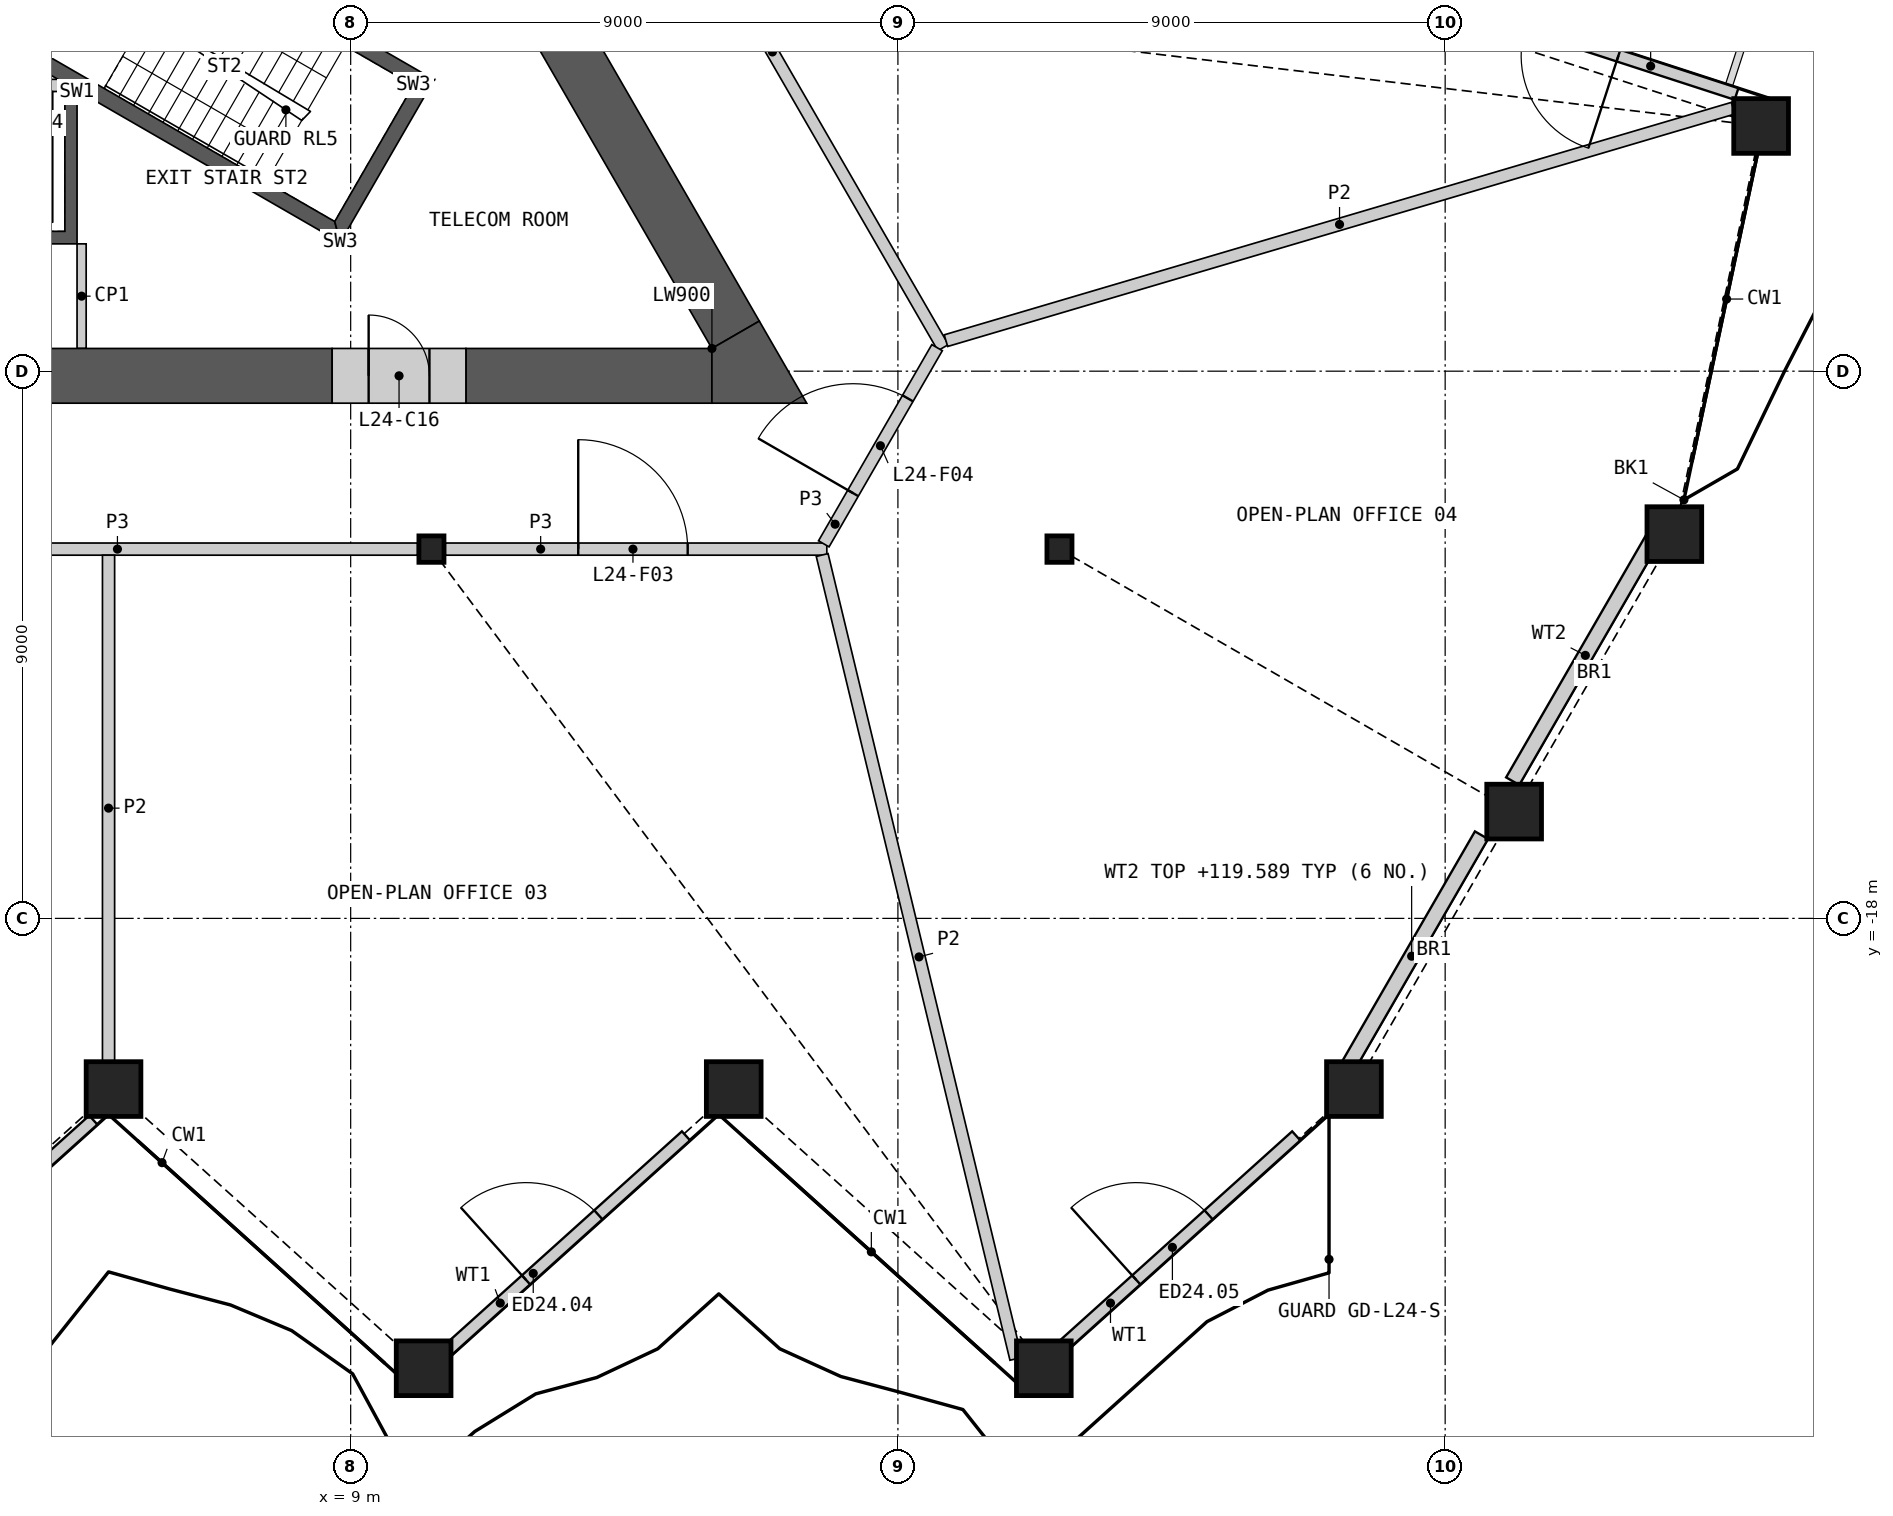
"""IFC4 building model, lengths in metres.
Left out: names, types, materials, properties, quantities, classifications, styles, units other than length and angle.
Written with IfcOpenShell. Run it as: python <this file> out.ifc"""

import sys

from ifc_helpers import new_model, si_unit, direction, frame, frame_2d, origin, origin_2d, place, context, subcontext, project, spatial, polyline, rectangle, hollow_rectangle, i_section, outline, extrude, element, fill, save


model = new_model("IFC4")
c1 = context("Model", 3, precision=1e-05, world=origin(), true_north=direction((0.0, 1.0)))
c2 = subcontext(c1, "Body", "Model", "MODEL_VIEW")
j1 = project(units=[si_unit("LENGTHUNIT", "METRE"), si_unit("PLANEANGLEUNIT", "RADIAN")], contexts=[c1])
p1 = place(None, origin())
s1 = spatial("IfcSite", under=j1, at=p1, CompositionType="ELEMENT")
p2 = place(p1, origin())
s2 = spatial("IfcBuilding", under=s1, at=p2, CompositionType="ELEMENT")
p3 = place(p2, frame((0.0, 0.0, 116.4)))
s3 = spatial("IfcBuildingStorey", under=s2, at=p3, CompositionType="ELEMENT", Elevation=116.4)
for number, where, z_axis, x_axis in (
    (1, (5.1, -20.807, 0.0), (0.0, 0.0, 1.0), (1.0, 0.0, 0.0)),
    (2, (10.2, -25.399, 0.0), (0.0, 0.0, 1.0), (1.0, 0.0, 0.0)),
    (3, (15.3, -20.807, 0.0), (0.0, 0.0, 1.0), (1.0, 0.0, 0.0)),
    (4, (20.4, -25.399, 0.0), (0.0, 0.0, 1.0), (1.0, 0.0, 0.0)),
    (5, (25.5, -20.807, 0.0), (0.0, 0.0, 1.0), (1.0, 0.0, 0.0)),
    (6, (28.135, -16.243, 0.0), (0.0, 0.0, 1.0), (1.0, 0.0, 0.0)),
    (7, (30.769, -11.68, 0.0), (0.0, 0.0, 1.0), (1.0, 0.0, 0.0)),
    (8, (32.196, -4.967, 0.0), (0.0, 0.0, 1.0), (1.0, 0.0, 0.0)),
):
    element("IfcColumn", number, at=place(p3, frame(where, z_axis=z_axis, x_axis=x_axis)), inside=s3, PredefinedType="COLUMN", context=c2, shape_type="SweptSolid", body=[
        extrude(hollow_rectangle(XDim=0.9, YDim=0.9, WallThickness=0.06, at=origin_2d()), origin(), (0.0, 0.0, 1.0), 4.2),
    ])
for number, where, z_axis, x_axis in (
    (9, (10.328, -11.926, 0.0), (0.0, 0.0, 1.0), (1.0, 0.0, 0.0)),
    (10, (20.657, -11.926, 0.0), (0.0, 0.0, 1.0), (1.0, 0.0, 0.0)),
):
    element("IfcColumn", number, at=place(p3, frame(where, z_axis=z_axis, x_axis=x_axis)), inside=s3, PredefinedType="COLUMN", context=c2, shape_type="SweptSolid", body=[
        extrude(i_section(OverallWidth=0.412, OverallDepth=0.435, WebThickness=0.036, FlangeThickness=0.057, at=origin_2d()), origin(), (0.0, 0.0, 1.0), 4.2),
    ])
p4 = place(p3, frame((0.406, -25.244, 0.0), z_axis=(0.0, 0.0, 1.0), x_axis=(0.743138997535, 0.669137078888, 0.0)))
e11 = element("IfcWall", 11, at=p4, inside=s3, PredefinedType="SOLIDWALL", context=c2, shape_type="SweptSolid", body=[
    extrude(rectangle(XDim=5.869, YDim=0.2, at=frame_2d((2.935, 0.0))), origin(), (0.0, 0.0, 1.0), 3.189),
])
p5 = place(p4, frame((1.94, 0.0, 0.0)))
e12 = element("IfcOpeningElement", 12, at=p5, cuts=e11, PredefinedType="OPENING", context=c2, shape_type="SweptSolid", body=[
    extrude(rectangle(XDim=1.6, YDim=2.4, at=frame_2d((0.8, 1.2))), frame((0.0, 0.11, 0.0), z_axis=(0.0, -1.0, 0.0), x_axis=(1.0, 0.0, 0.0)), (0.0, 0.0, 1.0), 0.22),
])
p6 = place(p3, frame((10.442, -25.244, 0.0), z_axis=(0.0, 0.0, 1.0), x_axis=(0.743134641601, 0.669141916526, 0.0)))
e13 = element("IfcWall", 13, at=p6, inside=s3, PredefinedType="SOLIDWALL", context=c2, shape_type="SweptSolid", body=[
    extrude(rectangle(XDim=5.48, YDim=0.2, at=frame_2d((2.74, 0.0))), origin(), (0.0, 0.0, 1.0), 3.189),
])
p7 = place(p6, frame((1.94, 0.0, 0.0)))
e14 = element("IfcOpeningElement", 14, at=p7, cuts=e13, PredefinedType="OPENING", context=c2, shape_type="SweptSolid", body=[
    extrude(rectangle(XDim=1.6, YDim=2.4, at=frame_2d((0.8, 1.2))), frame((0.0, 0.11, 0.0), z_axis=(0.0, -1.0, 0.0), x_axis=(1.0, 0.0, 0.0)), (0.0, 0.0, 1.0), 0.22),
])
p8 = place(p3, frame((20.478, -25.244, 0.0), z_axis=(0.0, 0.0, 1.0), x_axis=(0.743134641601, 0.669141916526, 0.0)))
e15 = element("IfcWall", 15, at=p8, inside=s3, PredefinedType="SOLIDWALL", context=c2, shape_type="SweptSolid", body=[
    extrude(rectangle(XDim=5.48, YDim=0.2, at=frame_2d((2.74, 0.0))), origin(), (0.0, 0.0, 1.0), 3.189),
])
p9 = place(p8, frame((1.94, 0.0, 0.0)))
e16 = element("IfcOpeningElement", 16, at=p9, cuts=e15, PredefinedType="OPENING", context=c2, shape_type="SweptSolid", body=[
    extrude(rectangle(XDim=1.6, YDim=2.4, at=frame_2d((0.8, 1.2))), frame((0.0, 0.11, 0.0), z_axis=(0.0, -1.0, 0.0), x_axis=(1.0, 0.0, 0.0)), (0.0, 0.0, 1.0), 0.22),
])
p10 = place(p3, frame((25.3, -20.612, 0.0), z_axis=(0.0, 0.0, 1.0), x_axis=(0.500018268964, 0.866014855936, 0.0)))
e17 = element("IfcWall", 17, at=p10, inside=s3, PredefinedType="SOLIDWALL", context=c2, shape_type="SweptSolid", body=[
    extrude(rectangle(XDim=4.596, YDim=0.25, at=frame_2d((2.298, 0.0))), origin(), (0.0, 0.0, 1.0), 3.189),
])
p11 = place(p3, frame((28.111, -15.743, 0.0), z_axis=(0.0, 0.0, 1.0), x_axis=(0.499984810975, 0.866034172995, 0.0)))
e18 = element("IfcWall", 18, at=p11, inside=s3, PredefinedType="SOLIDWALL", context=c2, shape_type="SweptSolid", body=[
    extrude(rectangle(XDim=4.78, YDim=0.25, at=frame_2d((2.39, 0.0))), origin(), (0.0, 0.0, 1.0), 3.189),
])
p12 = place(p3, frame((31.792, -4.441, 0.0), z_axis=(0.0, 0.0, 1.0), x_axis=(-0.951057028782, 0.309015417099, 0.0)))
e19 = element("IfcWall", 19, at=p12, inside=s3, PredefinedType="SOLIDWALL", context=c2, shape_type="SweptSolid", body=[
    extrude(rectangle(XDim=5.938, YDim=0.2, at=frame_2d((2.969, 0.0))), origin(), (0.0, 0.0, 1.0), 3.189),
])
p13 = place(p12, frame((2.042, 0.0, 0.0)))
e20 = element("IfcOpeningElement", 20, at=p13, cuts=e19, PredefinedType="OPENING", context=c2, shape_type="SweptSolid", body=[
    extrude(rectangle(XDim=1.6, YDim=2.4, at=frame_2d((0.8, 1.2))), frame((0.0, 0.11, 0.0), z_axis=(0.0, -1.0, 0.0), x_axis=(1.0, 0.0, 0.0)), (0.0, 0.0, 1.0), 0.22),
])
p14 = place(p3, origin())
e21 = element("IfcWall", 21, at=p14, inside=s3, PredefinedType="SHEAR", context=c2, shape_type="SweptSolid", body=[
    extrude(outline(polyline([(4.5, -4.4), (4.5, -6.906), (-4.5, -6.906), (-4.5, -4.4), (-4.3, -4.4), (-4.3, -6.7), (-2.3, -6.7), (-2.3, -4.4), (-2.1, -4.4), (-2.1, -6.7), (-0.1, -6.7), (-0.1, -4.4), (0.1, -4.4), (0.1, -6.7), (2.1, -6.7), (2.1, -4.4), (2.3, -4.4), (2.3, -6.7), (4.3, -6.7), (4.3, -4.4), (4.5, -4.4)])), origin(), (0.0, 0.0, 1.0), 3.8),
])
p15 = place(p3, frame((-4.187, -4.3, 0.0), z_axis=(0.0, 0.0, 1.0), x_axis=(1.0, 0.0, 0.0)))
e22 = element("IfcWall", 22, at=p15, inside=s3, PredefinedType="SOLIDWALL", context=c2, shape_type="SweptSolid", body=[
    extrude(rectangle(XDim=8.373, YDim=0.2, at=frame_2d((4.187, 0.0))), origin(), (0.0, 0.0, 1.0), 3.8),
])
p16 = place(p15, frame((0.287, 0.0, 0.0)))
e23 = element("IfcOpeningElement", 23, at=p16, cuts=e22, PredefinedType="OPENING", context=c2, shape_type="SweptSolid", body=[
    extrude(rectangle(XDim=1.2, YDim=2.1, at=frame_2d((0.6, 1.05))), frame((0.0, 0.11, 0.0), z_axis=(0.0, -1.0, 0.0), x_axis=(1.0, 0.0, 0.0)), (0.0, 0.0, 1.0), 0.22),
])
p17 = place(p15, frame((2.387, 0.0, 0.0)))
e24 = element("IfcOpeningElement", 24, at=p17, cuts=e22, PredefinedType="OPENING", context=c2, shape_type="SweptSolid", body=[
    extrude(rectangle(XDim=1.4, YDim=2.1, at=frame_2d((0.7, 1.05))), frame((0.0, 0.11, 0.0), z_axis=(0.0, -1.0, 0.0), x_axis=(1.0, 0.0, 0.0)), (0.0, 0.0, 1.0), 0.22),
])
p18 = place(p15, frame((4.737, 0.0, 0.0)))
e25 = element("IfcOpeningElement", 25, at=p18, cuts=e22, PredefinedType="OPENING", context=c2, shape_type="SweptSolid", body=[
    extrude(rectangle(XDim=1.1, YDim=2.1, at=frame_2d((0.55, 1.05))), frame((0.0, 0.11, 0.0), z_axis=(0.0, -1.0, 0.0), x_axis=(1.0, 0.0, 0.0)), (0.0, 0.0, 1.0), 0.22),
])
p19 = place(p15, frame((6.887, 0.0, 0.0)))
e26 = element("IfcOpeningElement", 26, at=p19, cuts=e22, PredefinedType="OPENING", context=c2, shape_type="SweptSolid", body=[
    extrude(rectangle(XDim=1.2, YDim=2.1, at=frame_2d((0.6, 1.05))), frame((0.0, 0.11, 0.0), z_axis=(0.0, -1.0, 0.0), x_axis=(1.0, 0.0, 0.0)), (0.0, 0.0, 1.0), 0.22),
])
p20 = place(p3, origin())
e27 = element("IfcWall", 27, at=p20, inside=s3, PredefinedType="SHEAR", context=c2, shape_type="SweptSolid", body=[
    extrude(outline(polyline([(3.763, -3.956), (8.83, -6.881), (8.738, -6.539), (3.888, -3.739), (3.763, -3.956)])), origin(), (0.0, 0.0, 1.0), 3.8),
])
p21 = place(p3, origin())
e28 = element("IfcWall", 28, at=p21, inside=s3, PredefinedType="SHEAR", context=c2, shape_type="SweptSolid", body=[
    extrude(outline(polyline([(8.83, -6.881), (10.374, -4.206), (10.032, -4.298), (8.738, -6.539), (8.83, -6.881)])), origin(), (0.0, 0.0, 1.0), 3.8),
])
p22 = place(p3, origin())
e29 = element("IfcWall", 29, at=p22, inside=s3, PredefinedType="SHEAR", context=c2, shape_type="SweptSolid", body=[
    extrude(outline(polyline([(10.032, -4.298), (10.374, -4.206), (5.307, -1.281), (5.182, -1.498), (10.032, -4.298)])), origin(), (0.0, 0.0, 1.0), 3.8),
])
p23 = place(p3, frame((3.655, -3.893, 0.0), z_axis=(0.0, 0.0, 1.0), x_axis=(0.499982516597, 0.866035497597, 0.0)))
e30 = element("IfcWall", 30, at=p23, inside=s3, PredefinedType="SHEAR", context=c2, shape_type="SweptSolid", body=[
    extrude(rectangle(XDim=3.088, YDim=0.25, at=frame_2d((1.544, 0.0))), origin(), (0.0, 0.0, 1.0), 3.8),
])
p24 = place(p23, frame((0.994, 0.0, 0.0)))
e31 = element("IfcOpeningElement", 31, at=p24, cuts=e30, PredefinedType="OPENING", context=c2, shape_type="SweptSolid", body=[
    extrude(rectangle(XDim=1.1, YDim=2.1, at=frame_2d((0.55, 1.05))), frame((0.0, 0.135, 0.0), z_axis=(0.0, -1.0, 0.0), x_axis=(1.0, 0.0, 0.0)), (0.0, 0.0, 1.0), 0.27),
])
p25 = place(p3, frame((4.575, -6.906, 0.0), z_axis=(0.0, 0.0, 1.0), x_axis=(0.0, -1.0, 0.0)))
e32 = element("IfcWall", 32, at=p25, inside=s3, PredefinedType="PARTITIONING", context=c2, shape_type="SweptSolid", body=[
    extrude(rectangle(XDim=1.72, YDim=0.15, at=frame_2d((0.86, 0.0))), origin(), (0.0, 0.0, 1.0), 3.8),
])
p26 = place(p3, frame((1.1, -9.076, 0.0), z_axis=(0.0, 0.0, 1.0), x_axis=(1.0, 0.0, 0.0)))
e33 = element("IfcWall", 33, at=p26, inside=s3, PredefinedType="SHEAR", context=c2, shape_type="SweptSolid", body=[
    extrude(rectangle(XDim=7.595, YDim=0.9, at=frame_2d((3.798, 0.0))), origin(), (0.0, 0.0, 1.0), 3.8),
])
p27 = place(p3, frame((10.896, -9.076, 0.0), z_axis=(0.0, 0.0, 1.0), x_axis=(1.0, 0.0, 0.0)))
e34 = element("IfcWall", 34, at=p27, inside=s3, PredefinedType="SHEAR", context=c2, shape_type="SweptSolid", body=[
    extrude(rectangle(XDim=4.046, YDim=0.9, at=frame_2d((2.023, 0.0))), origin(), (0.0, 0.0, 1.0), 3.8),
])
p28 = place(p3, frame((15.331, -8.401, 0.0), z_axis=(0.0, 0.0, 1.0), x_axis=(-0.49999216708, 0.866029926076, 0.0)))
e35 = element("IfcWall", 35, at=p28, inside=s3, PredefinedType="SHEAR", context=c2, shape_type="SweptSolid", body=[
    extrude(rectangle(XDim=12.641, YDim=0.9, at=frame_2d((6.321, 0.0))), origin(), (0.0, 0.0, 1.0), 3.8),
])
p29 = place(p3, origin())
e36 = element("IfcWall", 36, at=p29, inside=s3, PredefinedType="SHEAR", context=c2, shape_type="SweptSolid", body=[
    extrude(outline(polyline([(14.941, -8.626), (15.721, -8.176), (16.5, -9.526), (14.941, -9.526), (14.941, -8.626)])), origin(), (0.0, 0.0, 1.0), 3.8),
])
p30 = place(p3, frame((8.696, -9.076, 0.0), z_axis=(0.0, 0.0, 1.0), x_axis=(1.0, 0.0, 0.0)))
e37 = element("IfcWall", 37, at=p30, inside=s3, PredefinedType="SHEAR", context=c2, shape_type="SweptSolid", body=[
    extrude(rectangle(XDim=2.2, YDim=0.9, at=frame_2d((1.1, 0.0))), origin(), (0.0, 0.0, 1.0), 3.8),
])
p31 = place(p30, frame((0.6, 0.0, 0.0)))
e38 = element("IfcOpeningElement", 38, at=p31, cuts=e37, PredefinedType="OPENING", context=c2, shape_type="SweptSolid", body=[
    extrude(rectangle(XDim=1.0, YDim=2.1, at=frame_2d((0.5, 1.05))), frame((0.0, 0.46, 0.0), z_axis=(0.0, -1.0, 0.0), x_axis=(1.0, 0.0, 0.0)), (0.0, 0.0, 1.0), 0.92),
])
p32 = place(p3, frame((0.227, -11.926, 0.0), z_axis=(0.0, 0.0, 1.0), x_axis=(1.0, 0.0, 0.0)))
e39 = element("IfcWall", 39, at=p32, inside=s3, PredefinedType="PARTITIONING", context=c2, shape_type="SweptSolid", body=[
    extrude(rectangle(XDim=9.874, YDim=0.2, at=frame_2d((4.937, 0.0))), origin(), (0.0, 0.0, 1.0), 3.8),
])
p33 = place(p3, frame((10.556, -11.926, 0.0), z_axis=(0.0, 0.0, 1.0), x_axis=(1.0, 0.0, 0.0)))
e40 = element("IfcWall", 40, at=p33, inside=s3, PredefinedType="PARTITIONING", context=c2, shape_type="SweptSolid", body=[
    extrude(rectangle(XDim=6.275, YDim=0.2, at=frame_2d((3.137, 0.0))), origin(), (0.0, 0.0, 1.0), 3.8),
])
p34 = place(p33, frame((2.187, 0.0, 0.0)))
e41 = element("IfcOpeningElement", 41, at=p34, cuts=e40, PredefinedType="OPENING", context=c2, shape_type="SweptSolid", body=[
    extrude(rectangle(XDim=1.8, YDim=2.1, at=frame_2d((0.9, 1.05))), frame((0.0, 0.11, 0.0), z_axis=(0.0, -1.0, 0.0), x_axis=(1.0, 0.0, 0.0)), (0.0, 0.0, 1.0), 0.22),
])
p35 = place(p3, frame((15.624, -3.209, 0.0), z_axis=(0.0, 0.0, 1.0), x_axis=(0.499997920671, -0.866026604282, 0.0)))
e42 = element("IfcWall", 42, at=p35, inside=s3, PredefinedType="PARTITIONING", context=c2, shape_type="SweptSolid", body=[
    extrude(rectangle(XDim=6.24, YDim=0.2, at=frame_2d((3.12, 0.0))), origin(), (0.0, 0.0, 1.0), 3.8),
])
p36 = place(p3, frame((16.781, -11.84, 0.0), z_axis=(0.0, 0.0, 1.0), x_axis=(0.499958791762, 0.866049194065, 0.0)))
e43 = element("IfcWall", 43, at=p36, inside=s3, PredefinedType="PARTITIONING", context=c2, shape_type="SweptSolid", body=[
    extrude(rectangle(XDim=3.726, YDim=0.2, at=frame_2d((1.863, 0.0))), origin(), (0.0, 0.0, 1.0), 3.8),
])
p37 = place(p36, frame((0.963, 0.0, 0.0)))
e44 = element("IfcOpeningElement", 44, at=p37, cuts=e43, PredefinedType="OPENING", context=c2, shape_type="SweptSolid", body=[
    extrude(rectangle(XDim=1.8, YDim=2.1, at=frame_2d((0.9, 1.05))), frame((0.0, 0.11, 0.0), z_axis=(0.0, -1.0, 0.0), x_axis=(1.0, 0.0, 0.0)), (0.0, 0.0, 1.0), 0.22),
])
p38 = place(p3, frame((16.754, -12.023, 0.0), z_axis=(0.0, 0.0, 1.0), x_axis=(0.234226353532, -0.972182089586, 0.0)))
e45 = element("IfcWall", 45, at=p38, inside=s3, PredefinedType="PARTITIONING", context=c2, shape_type="SweptSolid", body=[
    extrude(rectangle(XDim=13.599, YDim=0.2, at=frame_2d((6.8, 0.0))), origin(), (0.0, 0.0, 1.0), 2.885),
])
p39 = place(p3, frame((18.79, -8.498, 0.0), z_axis=(0.0, 0.0, 1.0), x_axis=(0.959053889024, 0.283223653581, 0.0)))
e46 = element("IfcWall", 46, at=p39, inside=s3, PredefinedType="PARTITIONING", context=c2, shape_type="SweptSolid", body=[
    extrude(rectangle(XDim=13.499, YDim=0.2, at=frame_2d((6.75, 0.0))), origin(), (0.0, 0.0, 1.0), 2.885),
])
p40 = place(p3, frame((5.018, -20.347, 0.0), z_axis=(0.0, 0.0, 1.0), x_axis=(0.0, 1.0, 0.0)))
e47 = element("IfcWall", 47, at=p40, inside=s3, PredefinedType="PARTITIONING", context=c2, shape_type="SweptSolid", body=[
    extrude(rectangle(XDim=8.321, YDim=0.2, at=frame_2d((4.16, 0.0))), origin(), (0.0, 0.0, 1.0), 2.885),
])
p41 = place(p7, origin())
e48 = element("IfcDoor", 48, at=p41, inside=s3, OperationType="DOUBLE_DOOR_SINGLE_SWING", PredefinedType="DOOR", context=c2, shape_type="SweptSolid", body=[
    extrude(rectangle(XDim=1.6, YDim=2.4, at=frame_2d((0.8, 1.2))), frame((0.0, 0.025, 0.0), z_axis=(0.0, -1.0, 0.0), x_axis=(1.0, 0.0, 0.0)), (0.0, 0.0, 1.0), 0.05),
])
fill(e14, e48)
p42 = place(p9, origin())
e49 = element("IfcDoor", 49, at=p42, inside=s3, OperationType="DOUBLE_DOOR_SINGLE_SWING", PredefinedType="DOOR", context=c2, shape_type="SweptSolid", body=[
    extrude(rectangle(XDim=1.6, YDim=2.4, at=frame_2d((0.8, 1.2))), frame((0.0, 0.025, 0.0), z_axis=(0.0, -1.0, 0.0), x_axis=(1.0, 0.0, 0.0)), (0.0, 0.0, 1.0), 0.05),
])
fill(e16, e49)
p43 = place(p13, origin())
e50 = element("IfcDoor", 50, at=p43, inside=s3, OperationType="DOUBLE_DOOR_SINGLE_SWING", PredefinedType="DOOR", context=c2, shape_type="SweptSolid", body=[
    extrude(rectangle(XDim=1.6, YDim=2.4, at=frame_2d((0.8, 1.2))), frame((0.0, 0.025, 0.0), z_axis=(0.0, -1.0, 0.0), x_axis=(1.0, 0.0, 0.0)), (0.0, 0.0, 1.0), 0.05),
])
fill(e20, e50)
p44 = place(p31, origin())
e51 = element("IfcDoor", 51, at=p44, inside=s3, OperationType="SINGLE_SWING_LEFT", PredefinedType="DOOR", context=c2, shape_type="SweptSolid", body=[
    extrude(rectangle(XDim=1.0, YDim=2.1, at=frame_2d((0.5, 1.05))), frame((0.0, 0.205, 0.0), z_axis=(0.0, -1.0, 0.0), x_axis=(1.0, 0.0, 0.0)), (0.0, 0.0, 1.0), 0.05),
])
fill(e38, e51)
p45 = place(p34, origin())
e52 = element("IfcDoor", 52, at=p45, inside=s3, OperationType="DOUBLE_DOOR_SINGLE_SWING", PredefinedType="DOOR", context=c2, shape_type="SweptSolid", body=[
    extrude(rectangle(XDim=1.8, YDim=2.1, at=frame_2d((0.9, 1.05))), frame((0.0, 0.025, 0.0), z_axis=(0.0, -1.0, 0.0), x_axis=(1.0, 0.0, 0.0)), (0.0, 0.0, 1.0), 0.05),
])
fill(e41, e52)
p46 = place(p37, origin())
e53 = element("IfcDoor", 53, at=p46, inside=s3, OperationType="DOUBLE_DOOR_SINGLE_SWING", PredefinedType="DOOR", context=c2, shape_type="SweptSolid", body=[
    extrude(rectangle(XDim=1.8, YDim=2.1, at=frame_2d((0.9, 1.05))), frame((0.0, 0.025, 0.0), z_axis=(0.0, -1.0, 0.0), x_axis=(1.0, 0.0, 0.0)), (0.0, 0.0, 1.0), 0.05),
])
fill(e44, e53)
save(model, sys.argv[1])
